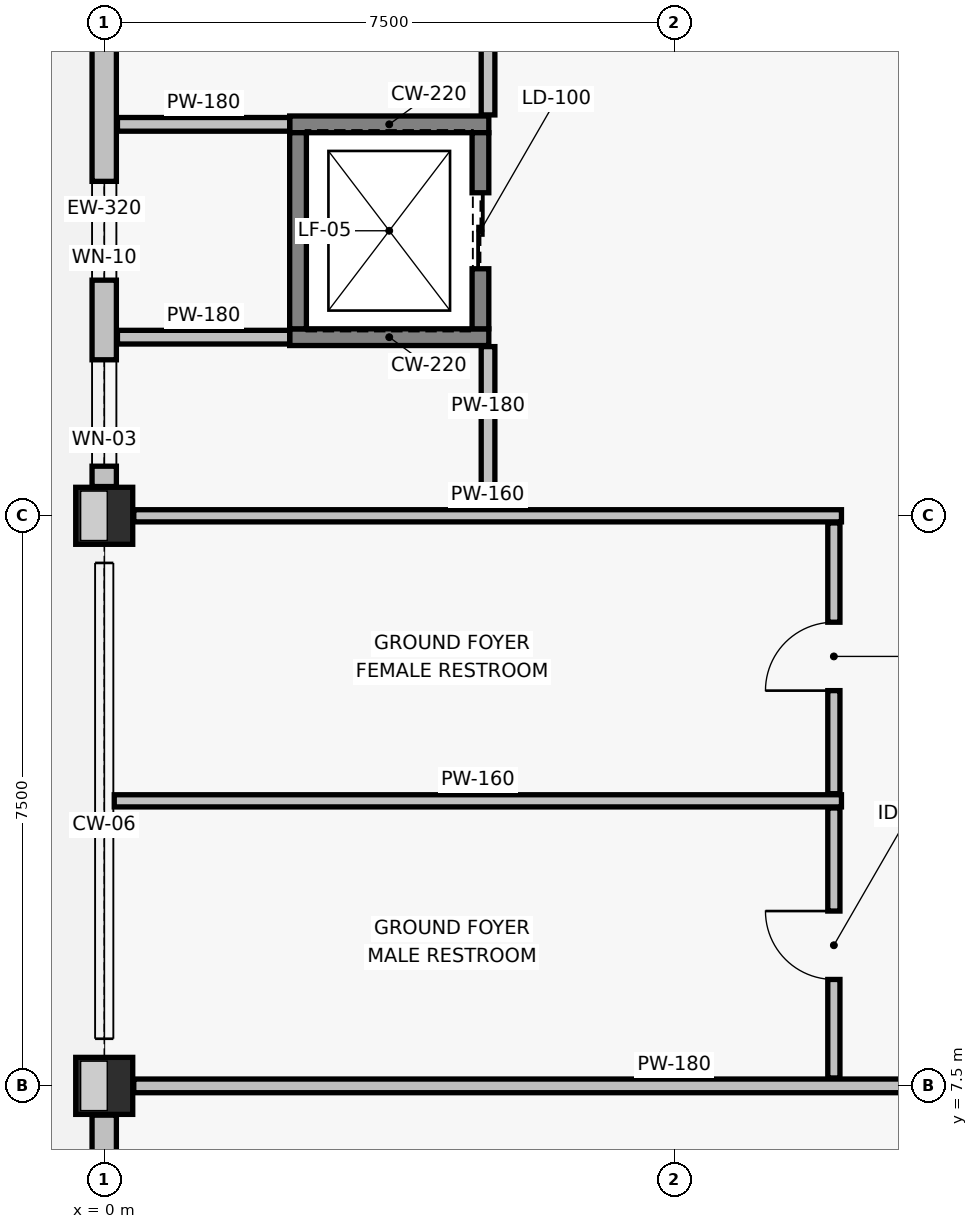
"""IFC4 building model, lengths in metres.
Left out: names, types, materials, properties, quantities, classifications, styles, units other than length and angle.
Written with IfcOpenShell. Run it as: python <this file> out.ifc"""

import sys

from ifc_helpers import new_model, si_unit, direction, frame, frame_2d, origin, origin_2d, place, context, subcontext, project, spatial, rectangle, circle, extrude, element, fill, save


model = new_model("IFC4")
c1 = context("Model", 3, precision=1e-05, world=origin(), true_north=direction((0.0, 1.0)))
c2 = subcontext(c1, "Body", "Model", "MODEL_VIEW")
j1 = project(units=[si_unit("LENGTHUNIT", "METRE"), si_unit("PLANEANGLEUNIT", "RADIAN")], contexts=[c1])
p1 = place(None, origin())
s1 = spatial("IfcSite", under=j1, at=p1, CompositionType="ELEMENT")
p2 = place(p1, origin())
s2 = spatial("IfcBuilding", under=s1, at=p2, CompositionType="ELEMENT")
p3 = place(p2, origin())
s3 = spatial("IfcBuildingStorey", under=s2, at=p3, CompositionType="ELEMENT", Elevation=0.0)
for number, where, z_axis, x_axis in (
    (1, (0.0, 7.5, 0.0), (0.0, 0.0, 1.0), (1.0, 0.0, 0.0)),
    (2, (0.0, 15.0, 0.0), (0.0, 0.0, 1.0), (1.0, 0.0, 0.0)),
):
    element("IfcColumn", number, at=place(p3, frame(where, z_axis=z_axis, x_axis=x_axis)), inside=s3, PredefinedType="COLUMN", context=c2, shape_type="SweptSolid", body=[
        extrude(circle(Radius=0.375, at=origin_2d()), origin(), (0.0, 0.0, 1.0), 4.8),
    ])
p4 = place(p3, frame((0.0, 0.385, 0.0), z_axis=(0.0, 0.0, 1.0), x_axis=(0.0, 1.0, 0.0)))
e3 = element("IfcWall", 3, at=p4, inside=s3, PredefinedType="SOLIDWALL", context=c2, shape_type="SweptSolid", body=[
    extrude(rectangle(XDim=6.73, YDim=0.32, at=frame_2d((3.365, 0.0))), origin(), (0.0, 0.0, 1.0), 2.97),
])
p5 = place(p4, frame((1.25, 0.0, 0.6)))
e4 = element("IfcOpeningElement", 4, at=p5, cuts=e3, PredefinedType="OPENING", context=c2, shape_type="SweptSolid", body=[
    extrude(rectangle(XDim=1.1, YDim=1.8, at=frame_2d((0.55, 0.9))), frame((0.0, 0.17, 0.0), z_axis=(0.0, -1.0, 0.0), x_axis=(1.0, 0.0, 0.0)), (0.0, 0.0, 1.0), 0.34),
])
p6 = place(p3, frame((0.0, 15.385, 0.0), z_axis=(0.0, 0.0, 1.0), x_axis=(0.0, 1.0, 0.0)))
e5 = element("IfcWall", 5, at=p6, inside=s3, PredefinedType="SOLIDWALL", context=c2, shape_type="SweptSolid", body=[
    extrude(rectangle(XDim=6.73, YDim=0.32, at=frame_2d((3.365, 0.0))), origin(), (0.0, 0.0, 1.0), 2.97),
])
p7 = place(p6, frame((0.268, 0.0, 0.6)))
e6 = element("IfcOpeningElement", 6, at=p7, cuts=e5, PredefinedType="OPENING", context=c2, shape_type="SweptSolid", body=[
    extrude(rectangle(XDim=1.4, YDim=1.8, at=frame_2d((0.7, 0.9))), frame((0.0, 0.17, 0.0), z_axis=(0.0, -1.0, 0.0), x_axis=(1.0, 0.0, 0.0)), (0.0, 0.0, 1.0), 0.34),
])
p8 = place(p6, frame((2.715, 0.0, 0.6)))
e7 = element("IfcOpeningElement", 7, at=p8, cuts=e5, PredefinedType="OPENING", context=c2, shape_type="SweptSolid", body=[
    extrude(rectangle(XDim=1.3, YDim=1.3, at=frame_2d((0.65, 0.65))), frame((0.0, 0.17, 0.0), z_axis=(0.0, -1.0, 0.0), x_axis=(1.0, 0.0, 0.0)), (0.0, 0.0, 1.0), 0.34),
])
for number, where, z_axis, x_axis in (
    (8, (2.44, 17.35, 0.0), (0.0, 0.0, 1.0), (1.0, 0.0, 0.0)),
    (9, (2.44, 20.15, 0.0), (0.0, 0.0, 1.0), (1.0, 0.0, 0.0)),
):
    element("IfcWall", number, at=place(p3, frame(where, z_axis=z_axis, x_axis=x_axis)), inside=s3, PredefinedType="SOLIDWALL", context=c2, shape_type="SweptSolid", body=[
        extrude(rectangle(XDim=2.62, YDim=0.22, at=frame_2d((1.31, 0.0))), origin(), (0.0, 0.0, 1.0), 4.5),
    ])
p9 = place(p3, frame((2.55, 17.46, 0.0), z_axis=(0.0, 0.0, 1.0), x_axis=(0.0, 1.0, 0.0)))
e10 = element("IfcWall", 10, at=p9, inside=s3, PredefinedType="SOLIDWALL", context=c2, shape_type="SweptSolid", body=[
    extrude(rectangle(XDim=2.58, YDim=0.22, at=frame_2d((1.29, 0.0))), origin(), (0.0, 0.0, 1.0), 4.5),
])
p10 = place(p3, frame((4.95, 17.46, 0.0), z_axis=(0.0, 0.0, 1.0), x_axis=(0.0, 1.0, 0.0)))
e11 = element("IfcWall", 11, at=p10, inside=s3, PredefinedType="SOLIDWALL", context=c2, shape_type="SweptSolid", body=[
    extrude(rectangle(XDim=2.58, YDim=0.22, at=frame_2d((1.29, 0.0))), origin(), (0.0, 0.0, 1.0), 4.5),
])
p11 = place(p10, frame((0.79, 0.0, 0.0)))
e12 = element("IfcOpeningElement", 12, at=p11, cuts=e11, PredefinedType="OPENING", context=c2, shape_type="SweptSolid", body=[
    extrude(rectangle(XDim=1.0, YDim=2.15, at=frame_2d((0.5, 1.075))), frame((0.0, 0.12, 0.0), z_axis=(0.0, -1.0, 0.0), x_axis=(1.0, 0.0, 0.0)), (0.0, 0.0, 1.0), 0.24),
])
p12 = place(p3, frame((0.389, 7.5, 0.0), z_axis=(0.0, 0.0, 1.0), x_axis=(1.0, 0.0, 0.0)))
e13 = element("IfcWall", 13, at=p12, inside=s3, PredefinedType="PARTITIONING", context=c2, shape_type="SweptSolid", body=[
    extrude(rectangle(XDim=14.222, YDim=0.18, at=frame_2d((7.111, 0.0))), origin(), (0.0, 0.0, 1.0), 2.97),
])
p13 = place(p12, frame((10.961, 0.0, 0.0)))
e14 = element("IfcOpeningElement", 14, at=p13, cuts=e13, PredefinedType="OPENING", context=c2, shape_type="SweptSolid", body=[
    extrude(rectangle(XDim=1.9, YDim=2.18, at=frame_2d((0.95, 1.09))), frame((0.0, 0.1, 0.0), z_axis=(0.0, -1.0, 0.0), x_axis=(1.0, 0.0, 0.0)), (0.0, 0.0, 1.0), 0.2),
])
p14 = place(p3, frame((0.132, 11.25, 0.0), z_axis=(0.0, 0.0, 1.0), x_axis=(1.0, 0.0, 0.0)))
e15 = element("IfcWall", 15, at=p14, inside=s3, PredefinedType="PARTITIONING", context=c2, shape_type="SweptSolid", body=[
    extrude(rectangle(XDim=9.568, YDim=0.16, at=frame_2d((4.784, 0.0))), origin(), (0.0, 0.0, 1.0), 3.87),
])
p15 = place(p3, frame((0.389, 15.0, 0.0), z_axis=(0.0, 0.0, 1.0), x_axis=(1.0, 0.0, 0.0)))
e16 = element("IfcWall", 16, at=p15, inside=s3, PredefinedType="PARTITIONING", context=c2, shape_type="SweptSolid", body=[
    extrude(rectangle(XDim=9.311, YDim=0.16, at=frame_2d((4.656, 0.0))), origin(), (0.0, 0.0, 1.0), 2.97),
])
p16 = place(p3, frame((9.6, 7.604, 0.0), z_axis=(0.0, 0.0, 1.0), x_axis=(0.0, 1.0, 0.0)))
e17 = element("IfcWall", 17, at=p16, inside=s3, PredefinedType="PARTITIONING", context=c2, shape_type="SweptSolid", body=[
    extrude(rectangle(XDim=3.552, YDim=0.16, at=frame_2d((1.776, 0.0))), origin(), (0.0, 0.0, 1.0), 2.97),
])
p17 = place(p16, frame((1.296, 0.0, 0.0)))
e18 = element("IfcOpeningElement", 18, at=p17, cuts=e17, PredefinedType="OPENING", context=c2, shape_type="SweptSolid", body=[
    extrude(rectangle(XDim=0.9, YDim=2.1, at=frame_2d((0.45, 1.05))), frame((0.0, 0.09, 0.0), z_axis=(0.0, -1.0, 0.0), x_axis=(1.0, 0.0, 0.0)), (0.0, 0.0, 1.0), 0.18),
])
p18 = place(p3, frame((9.6, 11.344, 0.0), z_axis=(0.0, 0.0, 1.0), x_axis=(0.0, 1.0, 0.0)))
e19 = element("IfcWall", 19, at=p18, inside=s3, PredefinedType="PARTITIONING", context=c2, shape_type="SweptSolid", body=[
    extrude(rectangle(XDim=3.562, YDim=0.16, at=frame_2d((1.781, 0.0))), origin(), (0.0, 0.0, 1.0), 2.97),
])
p19 = place(p18, frame((1.356, 0.0, 0.0)))
e20 = element("IfcOpeningElement", 20, at=p19, cuts=e19, PredefinedType="OPENING", context=c2, shape_type="SweptSolid", body=[
    extrude(rectangle(XDim=0.9, YDim=2.1, at=frame_2d((0.45, 1.05))), frame((0.0, 0.09, 0.0), z_axis=(0.0, -1.0, 0.0), x_axis=(1.0, 0.0, 0.0)), (0.0, 0.0, 1.0), 0.18),
])
for number, where, z_axis, x_axis in (
    (21, (0.174, 17.35, 0.0), (0.0, 0.0, 1.0), (1.0, 0.0, 0.0)),
    (22, (0.174, 20.15, 0.0), (0.0, 0.0, 1.0), (1.0, 0.0, 0.0)),
):
    element("IfcWall", number, at=place(p3, frame(where, z_axis=z_axis, x_axis=x_axis)), inside=s3, PredefinedType="PARTITIONING", context=c2, shape_type="SweptSolid", body=[
        extrude(rectangle(XDim=2.266, YDim=0.18, at=frame_2d((1.133, 0.0))), origin(), (0.0, 0.0, 1.0), 3.72),
    ])
p20 = place(p3, frame((5.05, 15.094, 0.0), z_axis=(0.0, 0.0, 1.0), x_axis=(0.0, 1.0, 0.0)))
e23 = element("IfcWall", 23, at=p20, inside=s3, PredefinedType="PARTITIONING", context=c2, shape_type="SweptSolid", body=[
    extrude(rectangle(XDim=2.132, YDim=0.18, at=frame_2d((1.066, 0.0))), origin(), (0.0, 0.0, 1.0), 2.97),
])
p21 = place(p3, frame((5.05, 20.274, 0.0), z_axis=(0.0, 0.0, 1.0), x_axis=(0.0, 1.0, 0.0)))
e24 = element("IfcWall", 24, at=p21, inside=s3, PredefinedType="PARTITIONING", context=c2, shape_type="SweptSolid", body=[
    extrude(rectangle(XDim=3.462, YDim=0.18, at=frame_2d((1.731, 0.0))), origin(), (0.0, 0.0, 1.0), 2.97),
])
p22 = place(p7, origin())
e25 = element("IfcWindow", 25, at=p22, inside=s3, PartitioningType="SINGLE_PANEL", PredefinedType="WINDOW", context=c2, shape_type="SweptSolid", body=[
    extrude(rectangle(XDim=1.4, YDim=1.8, at=frame_2d((0.7, 0.9))), frame((0.0, 0.03, 0.0), z_axis=(0.0, -1.0, 0.0), x_axis=(1.0, 0.0, 0.0)), (0.0, 0.0, 1.0), 0.06),
])
fill(e6, e25)
p23 = place(p8, origin())
e26 = element("IfcWindow", 26, at=p23, inside=s3, PartitioningType="SINGLE_PANEL", PredefinedType="WINDOW", context=c2, shape_type="SweptSolid", body=[
    extrude(rectangle(XDim=1.3, YDim=1.3, at=frame_2d((0.65, 0.65))), frame((0.0, 0.03, 0.0), z_axis=(0.0, -1.0, 0.0), x_axis=(1.0, 0.0, 0.0)), (0.0, 0.0, 1.0), 0.06),
])
fill(e7, e26)
p24 = place(p11, origin())
e27 = element("IfcDoor", 27, at=p24, inside=s3, OperationType="SLIDING_TO_LEFT", PredefinedType="DOOR", context=c2, shape_type="SweptSolid", body=[
    extrude(rectangle(XDim=1.0, YDim=2.15, at=frame_2d((0.5, 1.075))), frame((0.0, 0.025, 0.0), z_axis=(0.0, -1.0, 0.0), x_axis=(1.0, 0.0, 0.0)), (0.0, 0.0, 1.0), 0.05),
])
fill(e12, e27)
p25 = place(p17, origin())
e28 = element("IfcDoor", 28, at=p25, inside=s3, OperationType="SINGLE_SWING_RIGHT", PredefinedType="DOOR", context=c2, shape_type="SweptSolid", body=[
    extrude(rectangle(XDim=0.9, YDim=2.1, at=frame_2d((0.45, 1.05))), frame((0.0, 0.025, 0.0), z_axis=(0.0, -1.0, 0.0), x_axis=(1.0, 0.0, 0.0)), (0.0, 0.0, 1.0), 0.05),
])
fill(e18, e28)
p26 = place(p19, origin())
e29 = element("IfcDoor", 29, at=p26, inside=s3, OperationType="SINGLE_SWING_LEFT", PredefinedType="DOOR", context=c2, shape_type="SweptSolid", body=[
    extrude(rectangle(XDim=0.9, YDim=2.1, at=frame_2d((0.45, 1.05))), frame((0.0, 0.025, 0.0), z_axis=(0.0, -1.0, 0.0), x_axis=(1.0, 0.0, 0.0)), (0.0, 0.0, 1.0), 0.05),
])
fill(e20, e29)
save(model, sys.argv[1])
